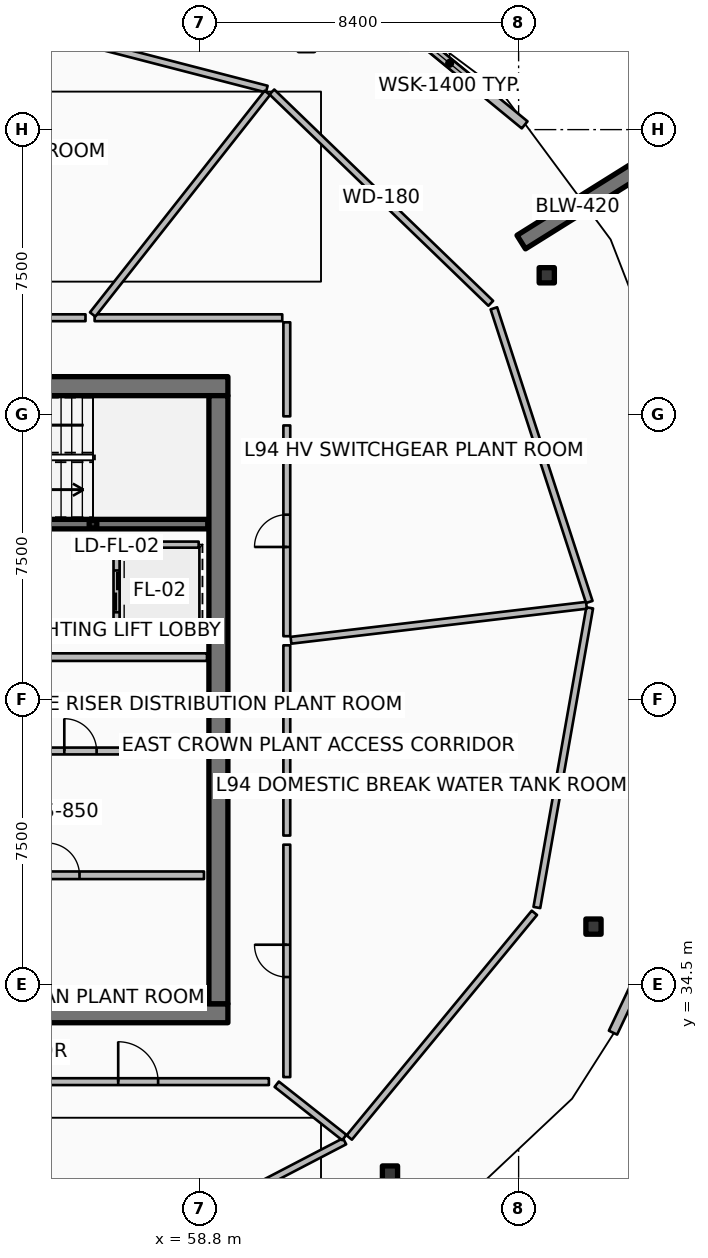
"""IFC4 building model, lengths in metres.
Left out: names, types, materials, properties, quantities, classifications, styles, units other than length and angle.
Written with IfcOpenShell. Run it as: python <this file> out.ifc"""

import sys

from ifc_helpers import new_model, si_unit, direction, frame, frame_2d, origin, origin_2d, place, context, subcontext, project, spatial, rectangle, hollow_rectangle, extrude, element, fill, save


model = new_model("IFC4")
c1 = context("Model", 3, precision=1e-05, world=origin(), true_north=direction((0.0, 1.0)))
c2 = subcontext(c1, "Body", "Model", "MODEL_VIEW")
j1 = project(units=[si_unit("LENGTHUNIT", "METRE"), si_unit("PLANEANGLEUNIT", "RADIAN")], contexts=[c1])
p1 = place(None, origin())
s1 = spatial("IfcSite", under=j1, at=p1, CompositionType="ELEMENT")
p2 = place(p1, origin())
s2 = spatial("IfcBuilding", under=s1, at=p2, CompositionType="ELEMENT")
p3 = place(p2, frame((0.0, 0.0, 374.0)))
s3 = spatial("IfcBuildingStorey", under=s2, at=p3, CompositionType="ELEMENT", Elevation=374.0)
for number, where, z_axis, x_axis in (
    (1, (49.95, 33.75, 0.0), (0.0, 0.0, 1.0), (1.0, 0.0, 0.0)),
    (2, (49.95, 50.25, 0.0), (0.0, 0.0, 1.0), (1.0, 0.0, 0.0)),
):
    element("IfcWall", number, at=place(p3, frame(where, z_axis=z_axis, x_axis=x_axis)), inside=s3, PredefinedType="SHEAR", context=c2, shape_type="SweptSolid", body=[
        extrude(rectangle(XDim=9.6, YDim=0.5, at=frame_2d((4.8, 0.0))), origin(), (0.0, 0.0, 1.0), 3.6),
    ])
p4 = place(p3, frame((59.3, 34.0, 0.0), z_axis=(0.0, 0.0, 1.0), x_axis=(0.0, 1.0, 0.0)))
e3 = element("IfcWall", 3, at=p4, inside=s3, PredefinedType="SHEAR", context=c2, shape_type="SweptSolid", body=[
    extrude(rectangle(XDim=16.0, YDim=0.5, at=frame_2d((8.0, 0.0))), origin(), (0.0, 0.0, 1.0), 3.6),
])
p5 = place(p3, frame((56.0, 46.62, 0.0), z_axis=(0.0, 0.0, 1.0), x_axis=(1.0, 0.0, 0.0)))
e4 = element("IfcColumn", 4, at=p5, inside=s3, PredefinedType="COLUMN", context=c2, shape_type="SweptSolid", body=[
    extrude(hollow_rectangle(XDim=0.2, YDim=0.2, WallThickness=0.01, InnerFilletRadius=0.01, OuterFilletRadius=0.02, at=origin_2d()), origin(), (0.0, 0.0, 1.0), 1.595),
])
p6 = place(p3, frame((67.269, 54.041, 0.0), z_axis=(0.0, 0.0, 1.0), x_axis=(0.848033572426, 0.529942506352, 0.0)))
e5 = element("IfcWall", 5, at=p6, inside=s3, PredefinedType="SOLIDWALL", context=c2, shape_type="SweptSolid", body=[
    extrude(rectangle(XDim=3.5, YDim=0.42, at=frame_2d((1.75, 0.0))), origin(), (0.0, 0.0, 1.0), 3.6),
])
for number, where, z_axis, x_axis in (
    (6, (67.941, 53.167, 0.0), (0.0, 0.0, 1.0), (1.0, 0.0, 0.0)),
    (7, (63.815, 29.532, 0.0), (0.0, 0.0, 1.0), (1.0, 0.0, 0.0)),
    (8, (69.17, 36.03, 0.0), (0.0, 0.0, 1.0), (1.0, 0.0, 0.0)),
):
    element("IfcColumn", number, at=place(p3, frame(where, z_axis=z_axis, x_axis=x_axis)), inside=s3, PredefinedType="COLUMN", context=c2, shape_type="SweptSolid", body=[
        extrude(hollow_rectangle(XDim=0.4, YDim=0.4, WallThickness=0.02, InnerFilletRadius=0.02, OuterFilletRadius=0.04, at=origin_2d()), origin(), (0.0, 0.0, 1.0), 3.36),
    ])
p7 = place(p3, frame((67.359, 57.125, 0.0), z_axis=(0.0, 0.0, 1.0), x_axis=(-0.772921300133, 0.634501902125, 0.0)))
e9 = element("IfcWall", 9, at=p7, inside=s3, PredefinedType="SOLIDWALL", context=c2, shape_type="SweptSolid", body=[
    extrude(rectangle(XDim=5.108, YDim=0.24, at=frame_2d((2.554, 0.0))), origin(), (0.0, 0.0, 1.0), 2.41),
])
p8 = place(p7, frame((1.854, 0.0, 1.35)))
e10 = element("IfcOpeningElement", 10, at=p8, cuts=e9, PredefinedType="OPENING", context=c2, shape_type="SweptSolid", body=[
    extrude(rectangle(XDim=1.4, YDim=0.75, at=frame_2d((0.7, 0.375))), frame((0.0, 0.13, 0.0), z_axis=(0.0, -1.0, 0.0), x_axis=(1.0, 0.0, 0.0)), (0.0, 0.0, 1.0), 0.26),
])
p9 = place(p3, frame((69.683, 33.239, 0.0), z_axis=(0.0, 0.0, 1.0), x_axis=(0.4282507592, 0.903659940046, 0.0)))
e11 = element("IfcWall", 11, at=p9, inside=s3, PredefinedType="SOLIDWALL", context=c2, shape_type="SweptSolid", body=[
    extrude(rectangle(XDim=5.042, YDim=0.24, at=frame_2d((2.521, 0.0))), origin(), (0.0, 0.0, 1.0), 2.41),
])
p10 = place(p9, frame((1.821, 0.0, 1.35)))
e12 = element("IfcOpeningElement", 12, at=p10, cuts=e11, PredefinedType="OPENING", context=c2, shape_type="SweptSolid", body=[
    extrude(rectangle(XDim=1.4, YDim=0.75, at=frame_2d((0.7, 0.375))), frame((0.0, 0.13, 0.0), z_axis=(0.0, -1.0, 0.0), x_axis=(1.0, 0.0, 0.0)), (0.0, 0.0, 1.0), 0.26),
])
p11 = place(p3, frame((51.48, 46.62, 0.0), z_axis=(0.0, 0.0, 1.0), x_axis=(1.0, 0.0, 0.0)))
e13 = element("IfcWall", 13, at=p11, inside=s3, PredefinedType="SOLIDWALL", context=c2, shape_type="SweptSolid", body=[
    extrude(rectangle(XDim=7.54, YDim=0.25, at=frame_2d((3.77, 0.0))), origin(), (0.0, 0.0, 1.0), 3.36),
])
p12 = place(p11, frame((0.3, 0.0, 0.0)))
e14 = element("IfcOpeningElement", 14, at=p12, cuts=e13, PredefinedType="OPENING", context=c2, shape_type="SweptSolid", body=[
    extrude(rectangle(XDim=1.55, YDim=2.15, at=frame_2d((0.775, 1.075))), frame((0.0, 0.135, 0.0), z_axis=(0.0, -1.0, 0.0), x_axis=(1.0, 0.0, 0.0)), (0.0, 0.0, 1.0), 0.27),
])
p13 = place(p3, frame((51.52, 37.38, 0.0), z_axis=(0.0, 0.0, 1.0), x_axis=(1.0, 0.0, 0.0)))
e15 = element("IfcWall", 15, at=p13, inside=s3, PredefinedType="PARTITIONING", context=c2, shape_type="SweptSolid", body=[
    extrude(rectangle(XDim=7.4, YDim=0.2, at=frame_2d((3.7, 0.0))), origin(), (0.0, 0.0, 1.0), 3.36),
])
p14 = place(p13, frame((3.275, 0.0, 0.0)))
e16 = element("IfcOpeningElement", 16, at=p14, cuts=e15, PredefinedType="OPENING", context=c2, shape_type="SweptSolid", body=[
    extrude(rectangle(XDim=0.85, YDim=2.06, at=frame_2d((0.425, 1.03))), frame((0.0, 0.11, 0.0), z_axis=(0.0, -1.0, 0.0), x_axis=(1.0, 0.0, 0.0)), (0.0, 0.0, 1.0), 0.22),
])
p15 = place(p3, frame((56.62, 46.08, 0.0), z_axis=(0.0, 0.0, 1.0), x_axis=(0.0, -1.0, 0.0)))
e17 = element("IfcWall", 17, at=p15, inside=s3, PredefinedType="PARTITIONING", context=c2, shape_type="SweptSolid", body=[
    extrude(rectangle(XDim=2.46, YDim=0.16, at=frame_2d((1.23, 0.0))), origin(), (0.0, 0.0, 1.0), 3.36),
])
p16 = place(p15, frame((0.68, 0.0, 0.0)))
e18 = element("IfcOpeningElement", 18, at=p16, cuts=e17, PredefinedType="OPENING", context=c2, shape_type="SweptSolid", body=[
    extrude(rectangle(XDim=1.1, YDim=2.1, at=frame_2d((0.55, 1.05))), frame((0.0, 0.09, 0.0), z_axis=(0.0, -1.0, 0.0), x_axis=(1.0, 0.0, 0.0)), (0.0, 0.0, 1.0), 0.18),
])
for number, where, z_axis, x_axis in (
    (19, (56.72, 46.08, 0.0), (0.0, 0.0, 1.0), (1.0, 0.0, 0.0)),
    (20, (56.72, 43.62, 0.0), (0.0, 0.0, 1.0), (1.0, 0.0, 0.0)),
):
    element("IfcWall", number, at=place(p3, frame(where, z_axis=z_axis, x_axis=x_axis)), inside=s3, PredefinedType="PARTITIONING", context=c2, shape_type="SweptSolid", body=[
        extrude(rectangle(XDim=2.06, YDim=0.16, at=frame_2d((1.03, 0.0))), origin(), (0.0, 0.0, 1.0), 3.36),
    ])
p17 = place(p3, frame((52.42, 40.65, 0.0), z_axis=(0.0, 0.0, 1.0), x_axis=(1.0, 0.0, 0.0)))
e21 = element("IfcWall", 21, at=p17, inside=s3, PredefinedType="PARTITIONING", context=c2, shape_type="SweptSolid", body=[
    extrude(rectangle(XDim=6.5, YDim=0.18, at=frame_2d((3.25, 0.0))), origin(), (0.0, 0.0, 1.0), 3.36),
])
p18 = place(p17, frame((2.825, 0.0, 0.0)))
e22 = element("IfcOpeningElement", 22, at=p18, cuts=e21, PredefinedType="OPENING", context=c2, shape_type="SweptSolid", body=[
    extrude(rectangle(XDim=0.85, YDim=2.06, at=frame_2d((0.425, 1.03))), frame((0.0, 0.1, 0.0), z_axis=(0.0, -1.0, 0.0), x_axis=(1.0, 0.0, 0.0)), (0.0, 0.0, 1.0), 0.2),
])
p19 = place(p3, frame((50.12, 43.12, 0.0), z_axis=(0.0, 0.0, 1.0), x_axis=(1.0, 0.0, 0.0)))
e23 = element("IfcWall", 23, at=p19, inside=s3, PredefinedType="PARTITIONING", context=c2, shape_type="SweptSolid", body=[
    extrude(rectangle(XDim=8.88, YDim=0.2, at=frame_2d((4.44, 0.0))), origin(), (0.0, 0.0, 1.0), 3.36),
])
p20 = place(p3, frame((66.467, 52.43, 0.0), z_axis=(0.0, 0.0, 1.0), x_axis=(-0.719364153135, 0.694633151516, 0.0)))
e24 = element("IfcWall", 24, at=p20, inside=s3, PredefinedType="PARTITIONING", context=c2, shape_type="SweptSolid", body=[
    extrude(rectangle(XDim=8.006, YDim=0.18, at=frame_2d((4.003, 0.0))), origin(), (0.0, 0.0, 1.0), 2.8),
])
p21 = place(p3, frame((60.573, 58.066, 0.0), z_axis=(0.0, 0.0, 1.0), x_axis=(-0.968117205342, 0.250497658115, 0.0)))
e25 = element("IfcWall", 25, at=p21, inside=s3, PredefinedType="PARTITIONING", context=c2, shape_type="SweptSolid", body=[
    extrude(rectangle(XDim=7.662, YDim=0.18, at=frame_2d((3.831, 0.0))), origin(), (0.0, 0.0, 1.0), 2.8),
])
p22 = place(p3, frame((56.41, 27.147, 0.0), z_axis=(0.0, 0.0, 1.0), x_axis=(0.886949494865, 0.461866423935, 0.0)))
e26 = element("IfcWall", 26, at=p22, inside=s3, PredefinedType="PARTITIONING", context=c2, shape_type="SweptSolid", body=[
    extrude(rectangle(XDim=7.002, YDim=0.18, at=frame_2d((3.501, 0.0))), origin(), (0.0, 0.0, 1.0), 2.8),
])
p23 = place(p3, frame((62.742, 30.48, 0.0), z_axis=(0.0, 0.0, 1.0), x_axis=(0.636018833443, 0.771673534278, 0.0)))
e27 = element("IfcWall", 27, at=p23, inside=s3, PredefinedType="PARTITIONING", context=c2, shape_type="SweptSolid", body=[
    extrude(rectangle(XDim=7.661, YDim=0.18, at=frame_2d((3.831, 0.0))), origin(), (0.0, 0.0, 1.0), 2.8),
])
p24 = place(p3, frame((67.68, 36.532, 0.0), z_axis=(0.0, 0.0, 1.0), x_axis=(0.173668776466, 0.984804120666, 0.0)))
e28 = element("IfcWall", 28, at=p24, inside=s3, PredefinedType="PARTITIONING", context=c2, shape_type="SweptSolid", body=[
    extrude(rectangle(XDim=8.006, YDim=0.18, at=frame_2d((4.003, 0.0))), origin(), (0.0, 0.0, 1.0), 2.8),
])
p25 = place(p3, frame((69.059, 44.572, 0.0), z_axis=(0.0, 0.0, 1.0), x_axis=(-0.309024234991, 0.951054163646, 0.0)))
e29 = element("IfcWall", 29, at=p25, inside=s3, PredefinedType="PARTITIONING", context=c2, shape_type="SweptSolid", body=[
    extrude(rectangle(XDim=8.124, YDim=0.18, at=frame_2d((4.062, 0.0))), origin(), (0.0, 0.0, 1.0), 2.8),
])
p26 = place(p3, frame((53.748, 31.95, 0.0), z_axis=(0.0, 0.0, 1.0), x_axis=(1.0, 0.0, 0.0)))
e30 = element("IfcWall", 30, at=p26, inside=s3, PredefinedType="PARTITIONING", context=c2, shape_type="SweptSolid", body=[
    extrude(rectangle(XDim=6.88, YDim=0.18, at=frame_2d((3.44, 0.0))), origin(), (0.0, 0.0, 1.0), 2.8),
])
p27 = place(p26, frame((2.915, 0.0, 0.0)))
e31 = element("IfcOpeningElement", 31, at=p27, cuts=e30, PredefinedType="OPENING", context=c2, shape_type="SweptSolid", body=[
    extrude(rectangle(XDim=1.05, YDim=2.1, at=frame_2d((0.525, 1.05))), frame((0.0, 0.1, 0.0), z_axis=(0.0, -1.0, 0.0), x_axis=(1.0, 0.0, 0.0)), (0.0, 0.0, 1.0), 0.2),
])
p28 = place(p3, frame((60.835, 31.882, 0.0), z_axis=(0.0, 0.0, 1.0), x_axis=(0.785329646864, -0.619077818821, 0.0)))
e32 = element("IfcWall", 32, at=p28, inside=s3, PredefinedType="PARTITIONING", context=c2, shape_type="SweptSolid", body=[
    extrude(rectangle(XDim=2.264, YDim=0.18, at=frame_2d((1.132, 0.0))), origin(), (0.0, 0.0, 1.0), 2.8),
])
p29 = place(p3, frame((61.1, 32.07, 0.0), z_axis=(0.0, 0.0, 1.0), x_axis=(0.0, 1.0, 0.0)))
e33 = element("IfcWall", 33, at=p29, inside=s3, PredefinedType="PARTITIONING", context=c2, shape_type="SweptSolid", body=[
    extrude(rectangle(XDim=6.115, YDim=0.18, at=frame_2d((3.058, 0.0))), origin(), (0.0, 0.0, 1.0), 2.8),
])
p30 = place(p29, frame((2.633, 0.0, 0.0)))
e34 = element("IfcOpeningElement", 34, at=p30, cuts=e33, PredefinedType="OPENING", context=c2, shape_type="SweptSolid", body=[
    extrude(rectangle(XDim=0.85, YDim=2.06, at=frame_2d((0.425, 1.03))), frame((0.0, 0.1, 0.0), z_axis=(0.0, -1.0, 0.0), x_axis=(1.0, 0.0, 0.0)), (0.0, 0.0, 1.0), 0.2),
])
p31 = place(p3, frame((61.1, 38.425, 0.0), z_axis=(0.0, 0.0, 1.0), x_axis=(0.0, 1.0, 0.0)))
e35 = element("IfcWall", 35, at=p31, inside=s3, PredefinedType="PARTITIONING", context=c2, shape_type="SweptSolid", body=[
    extrude(rectangle(XDim=5.005, YDim=0.18, at=frame_2d((2.502, 0.0))), origin(), (0.0, 0.0, 1.0), 2.8),
])
p32 = place(p3, frame((61.209, 43.563, 0.0), z_axis=(0.0, 0.0, 1.0), x_axis=(0.993070558818, 0.117519637545, 0.0)))
e36 = element("IfcWall", 36, at=p32, inside=s3, PredefinedType="PARTITIONING", context=c2, shape_type="SweptSolid", body=[
    extrude(rectangle(XDim=7.83, YDim=0.18, at=frame_2d((3.915, 0.0))), origin(), (0.0, 0.0, 1.0), 2.8),
])
p33 = place(p3, frame((61.1, 43.67, 0.0), z_axis=(0.0, 0.0, 1.0), x_axis=(0.0, 1.0, 0.0)))
e37 = element("IfcWall", 37, at=p33, inside=s3, PredefinedType="PARTITIONING", context=c2, shape_type="SweptSolid", body=[
    extrude(rectangle(XDim=5.546, YDim=0.18, at=frame_2d((2.773, 0.0))), origin(), (0.0, 0.0, 1.0), 2.8),
])
p34 = place(p33, frame((2.348, 0.0, 0.0)))
e38 = element("IfcOpeningElement", 38, at=p34, cuts=e37, PredefinedType="OPENING", context=c2, shape_type="SweptSolid", body=[
    extrude(rectangle(XDim=0.85, YDim=2.06, at=frame_2d((0.425, 1.03))), frame((0.0, 0.1, 0.0), z_axis=(0.0, -1.0, 0.0), x_axis=(1.0, 0.0, 0.0)), (0.0, 0.0, 1.0), 0.2),
])
p35 = place(p3, frame((61.1, 49.456, 0.0), z_axis=(0.0, 0.0, 1.0), x_axis=(0.0, 1.0, 0.0)))
e39 = element("IfcWall", 39, at=p35, inside=s3, PredefinedType="PARTITIONING", context=c2, shape_type="SweptSolid", body=[
    extrude(rectangle(XDim=2.474, YDim=0.18, at=frame_2d((1.237, 0.0))), origin(), (0.0, 0.0, 1.0), 2.8),
])
p36 = place(p3, frame((60.98, 52.05, 0.0), z_axis=(0.0, 0.0, 1.0), x_axis=(-1.0, 0.0, 0.0)))
e40 = element("IfcWall", 40, at=p36, inside=s3, PredefinedType="PARTITIONING", context=c2, shape_type="SweptSolid", body=[
    extrude(rectangle(XDim=4.937, YDim=0.18, at=frame_2d((2.469, 0.0))), origin(), (0.0, 0.0, 1.0), 2.8),
])
p37 = place(p3, frame((55.991, 52.136, 0.0), z_axis=(0.0, 0.0, 1.0), x_axis=(0.619089811342, 0.785320192974, 0.0)))
e41 = element("IfcWall", 41, at=p37, inside=s3, PredefinedType="PARTITIONING", context=c2, shape_type="SweptSolid", body=[
    extrude(rectangle(XDim=7.426, YDim=0.18, at=frame_2d((3.713, 0.0))), origin(), (0.0, 0.0, 1.0), 2.8),
])
p38 = place(p3, frame((55.803, 52.05, 0.0), z_axis=(0.0, 0.0, 1.0), x_axis=(-1.0, 0.0, 0.0)))
e42 = element("IfcWall", 42, at=p38, inside=s3, PredefinedType="PARTITIONING", context=c2, shape_type="SweptSolid", body=[
    extrude(rectangle(XDim=4.848, YDim=0.18, at=frame_2d((2.424, 0.0))), origin(), (0.0, 0.0, 1.0), 2.8),
])
p39 = place(p38, frame((1.999, 0.0, 0.0)))
e43 = element("IfcOpeningElement", 43, at=p39, cuts=e42, PredefinedType="OPENING", context=c2, shape_type="SweptSolid", body=[
    extrude(rectangle(XDim=0.85, YDim=2.06, at=frame_2d((0.425, 1.03))), frame((0.0, 0.1, 0.0), z_axis=(0.0, -1.0, 0.0), x_axis=(1.0, 0.0, 0.0)), (0.0, 0.0, 1.0), 0.2),
])
p40 = place(p8, origin())
e44 = element("IfcWindow", 44, at=p40, inside=s3, PartitioningType="SINGLE_PANEL", PredefinedType="SKYLIGHT", context=c2, shape_type="SweptSolid", body=[
    extrude(rectangle(XDim=1.4, YDim=0.75, at=frame_2d((0.7, 0.375))), frame((0.0, 0.03, 0.0), z_axis=(0.0, -1.0, 0.0), x_axis=(1.0, 0.0, 0.0)), (0.0, 0.0, 1.0), 0.06),
])
fill(e10, e44)
p41 = place(p14, origin())
e45 = element("IfcDoor", 45, at=p41, inside=s3, OperationType="SINGLE_SWING_LEFT", PredefinedType="DOOR", context=c2, shape_type="SweptSolid", body=[
    extrude(rectangle(XDim=0.85, YDim=2.06, at=frame_2d((0.425, 1.03))), frame((0.0, 0.025, 0.0), z_axis=(0.0, -1.0, 0.0), x_axis=(1.0, 0.0, 0.0)), (0.0, 0.0, 1.0), 0.05),
])
fill(e16, e45)
p42 = place(p16, origin())
e46 = element("IfcDoor", 46, at=p42, inside=s3, OperationType="DOUBLE_DOOR_SLIDING", PredefinedType="DOOR", context=c2, shape_type="SweptSolid", body=[
    extrude(rectangle(XDim=1.1, YDim=2.1, at=frame_2d((0.55, 1.05))), frame((0.0, 0.025, 0.0), z_axis=(0.0, -1.0, 0.0), x_axis=(1.0, 0.0, 0.0)), (0.0, 0.0, 1.0), 0.05),
])
fill(e18, e46)
p43 = place(p18, origin())
e47 = element("IfcDoor", 47, at=p43, inside=s3, OperationType="SINGLE_SWING_LEFT", PredefinedType="DOOR", context=c2, shape_type="SweptSolid", body=[
    extrude(rectangle(XDim=0.85, YDim=2.06, at=frame_2d((0.425, 1.03))), frame((0.0, 0.025, 0.0), z_axis=(0.0, -1.0, 0.0), x_axis=(1.0, 0.0, 0.0)), (0.0, 0.0, 1.0), 0.05),
])
fill(e22, e47)
p44 = place(p27, origin())
e48 = element("IfcDoor", 48, at=p44, inside=s3, OperationType="SINGLE_SWING_LEFT", PredefinedType="DOOR", context=c2, shape_type="SweptSolid", body=[
    extrude(rectangle(XDim=1.05, YDim=2.1, at=frame_2d((0.525, 1.05))), frame((0.0, 0.025, 0.0), z_axis=(0.0, -1.0, 0.0), x_axis=(1.0, 0.0, 0.0)), (0.0, 0.0, 1.0), 0.05),
])
fill(e31, e48)
p45 = place(p30, origin())
e49 = element("IfcDoor", 49, at=p45, inside=s3, OperationType="SINGLE_SWING_RIGHT", PredefinedType="DOOR", context=c2, shape_type="SweptSolid", body=[
    extrude(rectangle(XDim=0.85, YDim=2.06, at=frame_2d((0.425, 1.03))), frame((0.0, 0.025, 0.0), z_axis=(0.0, -1.0, 0.0), x_axis=(1.0, 0.0, 0.0)), (0.0, 0.0, 1.0), 0.05),
])
fill(e34, e49)
p46 = place(p34, origin())
e50 = element("IfcDoor", 50, at=p46, inside=s3, OperationType="SINGLE_SWING_LEFT", PredefinedType="DOOR", context=c2, shape_type="SweptSolid", body=[
    extrude(rectangle(XDim=0.85, YDim=2.06, at=frame_2d((0.425, 1.03))), frame((0.0, 0.025, 0.0), z_axis=(0.0, -1.0, 0.0), x_axis=(1.0, 0.0, 0.0)), (0.0, 0.0, 1.0), 0.05),
])
fill(e38, e50)
save(model, sys.argv[1])
